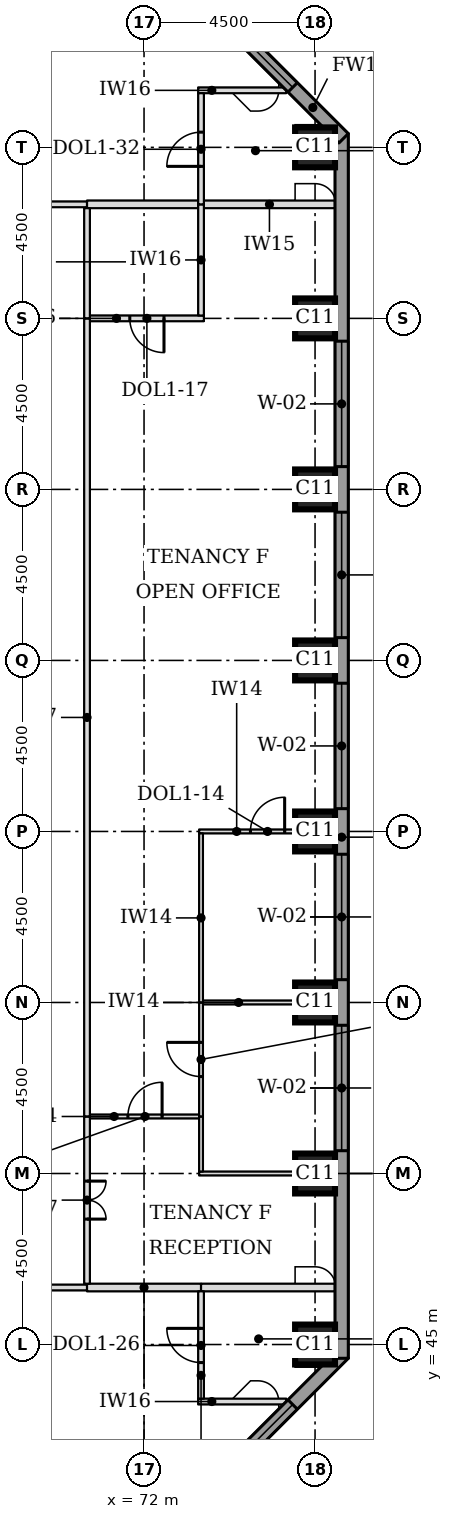
"""IFC4 building model, lengths in metres.
Left out: names, types, materials, properties, quantities, classifications, styles, units other than length and angle.
Written with IfcOpenShell. Run it as: python <this file> out.ifc"""

import sys

from ifc_helpers import new_model, si_unit, direction, frame, frame_2d, origin, origin_2d, place, context, subcontext, project, spatial, rectangle, extrude, element, fill, save


model = new_model("IFC4")
c1 = context("Model", 3, precision=1e-05, world=origin(), true_north=direction((0.0, 1.0)))
c2 = subcontext(c1, "Body", "Model", "MODEL_VIEW")
j1 = project(units=[si_unit("LENGTHUNIT", "METRE"), si_unit("PLANEANGLEUNIT", "RADIAN")], contexts=[c1])
p1 = place(None, origin())
s1 = spatial("IfcSite", under=j1, at=p1, CompositionType="ELEMENT")
p2 = place(p1, origin())
s2 = spatial("IfcBuilding", under=s1, at=p2, CompositionType="ELEMENT")
p3 = place(p2, frame((0.0, 0.0, 78.9)))
s3 = spatial("IfcBuildingStorey", under=s2, at=p3, CompositionType="ELEMENT", Elevation=78.9)
for number, where, z_axis, x_axis in (
    (1, (76.5, 45.0, 0.0), (0.0, 0.0, 1.0), (1.0, 0.0, 0.0)),
    (2, (76.5, 49.5, 0.0), (0.0, 0.0, 1.0), (1.0, 0.0, 0.0)),
    (3, (76.5, 54.0, 0.0), (0.0, 0.0, 1.0), (1.0, 0.0, 0.0)),
    (4, (76.5, 58.5, 0.0), (0.0, 0.0, 1.0), (1.0, 0.0, 0.0)),
    (5, (76.5, 63.0, 0.0), (0.0, 0.0, 1.0), (1.0, 0.0, 0.0)),
    (6, (76.5, 67.5, 0.0), (0.0, 0.0, 1.0), (1.0, 0.0, 0.0)),
    (7, (76.5, 72.0, 0.0), (0.0, 0.0, 1.0), (1.0, 0.0, 0.0)),
    (8, (76.5, 76.5, 0.0), (0.0, 0.0, 1.0), (1.0, 0.0, 0.0)),
):
    element("IfcColumn", number, at=place(p3, frame(where, z_axis=z_axis, x_axis=x_axis)), inside=s3, PredefinedType="COLUMN", context=c2, shape_type="SweptSolid", body=[
        extrude(rectangle(XDim=1.05, YDim=1.05, at=origin_2d()), origin(), (0.0, 0.0, 1.0), 3.7),
    ])
p4 = place(p3, frame((72.239, 39.749, 0.0), z_axis=(0.0, 0.0, 1.0), x_axis=(0.707106781187, 0.707106781187, 0.0)))
e9 = element("IfcWall", 9, at=p4, inside=s3, PredefinedType="STANDARD", context=c2, shape_type="SweptSolid", body=[
    extrude(rectangle(XDim=7.089, YDim=0.35, at=frame_2d((3.544, 0.0))), origin(), (0.0, 0.0, 1.0), 3.525),
])
p5 = place(p4, frame((1.894, 0.0, 0.9)))
e10 = element("IfcOpeningElement", 10, at=p5, cuts=e9, PredefinedType="OPENING", context=c2, shape_type="SweptSolid", body=[
    extrude(rectangle(XDim=3.3, YDim=1.9, at=frame_2d((1.65, 0.95))), frame((0.0, 0.185, 0.0), z_axis=(0.0, -1.0, 0.0), x_axis=(1.0, 0.0, 0.0)), (0.0, 0.0, 1.0), 0.37),
])
p6 = place(p3, frame((77.2, 44.638, 0.0), z_axis=(0.0, 0.0, 1.0), x_axis=(0.0, 1.0, 0.0)))
e11 = element("IfcWall", 11, at=p6, inside=s3, PredefinedType="STANDARD", context=c2, shape_type="SweptSolid", body=[
    extrude(rectangle(XDim=32.225, YDim=0.35, at=frame_2d((16.112, 0.0))), origin(), (0.0, 0.0, 1.0), 3.525),
])
p7 = place(p6, frame((5.462, 0.0, 0.9)))
e12 = element("IfcOpeningElement", 12, at=p7, cuts=e11, PredefinedType="OPENING", context=c2, shape_type="SweptSolid", body=[
    extrude(rectangle(XDim=3.3, YDim=1.9, at=frame_2d((1.65, 0.95))), frame((0.0, 0.185, 0.0), z_axis=(0.0, -1.0, 0.0), x_axis=(1.0, 0.0, 0.0)), (0.0, 0.0, 1.0), 0.37),
])
p8 = place(p6, frame((9.962, 0.0, 0.9)))
e13 = element("IfcOpeningElement", 13, at=p8, cuts=e11, PredefinedType="OPENING", context=c2, shape_type="SweptSolid", body=[
    extrude(rectangle(XDim=3.3, YDim=1.9, at=frame_2d((1.65, 0.95))), frame((0.0, 0.185, 0.0), z_axis=(0.0, -1.0, 0.0), x_axis=(1.0, 0.0, 0.0)), (0.0, 0.0, 1.0), 0.37),
])
p9 = place(p6, frame((14.462, 0.0, 0.9)))
e14 = element("IfcOpeningElement", 14, at=p9, cuts=e11, PredefinedType="OPENING", context=c2, shape_type="SweptSolid", body=[
    extrude(rectangle(XDim=3.3, YDim=1.9, at=frame_2d((1.65, 0.95))), frame((0.0, 0.185, 0.0), z_axis=(0.0, -1.0, 0.0), x_axis=(1.0, 0.0, 0.0)), (0.0, 0.0, 1.0), 0.37),
])
p10 = place(p6, frame((18.962, 0.0, 0.9)))
e15 = element("IfcOpeningElement", 15, at=p10, cuts=e11, PredefinedType="OPENING", context=c2, shape_type="SweptSolid", body=[
    extrude(rectangle(XDim=3.3, YDim=1.9, at=frame_2d((1.65, 0.95))), frame((0.0, 0.185, 0.0), z_axis=(0.0, -1.0, 0.0), x_axis=(1.0, 0.0, 0.0)), (0.0, 0.0, 1.0), 0.37),
])
p11 = place(p6, frame((23.462, 0.0, 0.9)))
e16 = element("IfcOpeningElement", 16, at=p11, cuts=e11, PredefinedType="OPENING", context=c2, shape_type="SweptSolid", body=[
    extrude(rectangle(XDim=3.3, YDim=1.9, at=frame_2d((1.65, 0.95))), frame((0.0, 0.185, 0.0), z_axis=(0.0, -1.0, 0.0), x_axis=(1.0, 0.0, 0.0)), (0.0, 0.0, 1.0), 0.37),
])
p12 = place(p3, frame((77.251, 76.739, 0.0), z_axis=(0.0, 0.0, 1.0), x_axis=(-0.707106781187, 0.707106781187, 0.0)))
e17 = element("IfcWall", 17, at=p12, inside=s3, PredefinedType="STANDARD", context=c2, shape_type="SweptSolid", body=[
    extrude(rectangle(XDim=7.089, YDim=0.35, at=frame_2d((3.544, 0.0))), origin(), (0.0, 0.0, 1.0), 3.525),
])
p13 = place(p12, frame((1.894, 0.0, 0.9)))
e18 = element("IfcOpeningElement", 18, at=p13, cuts=e17, PredefinedType="OPENING", context=c2, shape_type="SweptSolid", body=[
    extrude(rectangle(XDim=3.3, YDim=1.9, at=frame_2d((1.65, 0.95))), frame((0.0, 0.185, 0.0), z_axis=(0.0, -1.0, 0.0), x_axis=(1.0, 0.0, 0.0)), (0.0, 0.0, 1.0), 0.37),
])
p14 = place(p3, frame((73.425, 43.5, 0.0), z_axis=(0.0, 0.0, 1.0), x_axis=(1.0, 0.0, 0.0)))
e19 = element("IfcWall", 19, at=p14, inside=s3, PredefinedType="PARTITIONING", context=c2, shape_type="SweptSolid", body=[
    extrude(rectangle(XDim=2.317, YDim=0.15, at=frame_2d((1.159, 0.0))), origin(), (0.0, 0.0, 1.0), 3.55),
])
p15 = place(p3, frame((54.0, 46.5, 0.0), z_axis=(0.0, 0.0, 1.0), x_axis=(1.0, 0.0, 0.0)))
e20 = element("IfcWall", 20, at=p15, inside=s3, PredefinedType="PARTITIONING", context=c2, shape_type="SweptSolid", body=[
    extrude(rectangle(XDim=16.5, YDim=0.15, at=frame_2d((8.25, 0.0))), origin(), (0.0, 0.0, 1.0), 3.55),
])
p16 = place(p3, frame((70.5, 46.5, 0.0), z_axis=(0.0, 0.0, 1.0), x_axis=(1.0, 0.0, 0.0)))
e21 = element("IfcWall", 21, at=p16, inside=s3, PredefinedType="PARTITIONING", context=c2, shape_type="SweptSolid", body=[
    extrude(rectangle(XDim=3.0, YDim=0.2, at=frame_2d((1.5, 0.0))), origin(), (0.0, 0.0, 1.0), 3.55),
])
p17 = place(p3, frame((73.5, 46.5, 0.0), z_axis=(0.0, 0.0, 1.0), x_axis=(1.0, 0.0, 0.0)))
e22 = element("IfcWall", 22, at=p17, inside=s3, PredefinedType="PARTITIONING", context=c2, shape_type="SweptSolid", body=[
    extrude(rectangle(XDim=3.525, YDim=0.2, at=frame_2d((1.762, 0.0))), origin(), (0.0, 0.0, 1.0), 3.55),
])
p18 = place(p3, frame((73.45, 49.5, 0.0), z_axis=(0.0, 0.0, 1.0), x_axis=(1.0, 0.0, 0.0)))
e23 = element("IfcWall", 23, at=p18, inside=s3, PredefinedType="PARTITIONING", context=c2, shape_type="SweptSolid", body=[
    extrude(rectangle(XDim=3.575, YDim=0.1, at=frame_2d((1.788, 0.0))), origin(), (0.0, 0.0, 1.0), 3.55),
])
p19 = place(p3, frame((70.575, 51.0, 0.0), z_axis=(0.0, 0.0, 1.0), x_axis=(1.0, 0.0, 0.0)))
e24 = element("IfcWall", 24, at=p19, inside=s3, PredefinedType="PARTITIONING", context=c2, shape_type="SweptSolid", body=[
    extrude(rectangle(XDim=2.875, YDim=0.1, at=frame_2d((1.438, 0.0))), origin(), (0.0, 0.0, 1.0), 3.022),
])
p20 = place(p19, frame((1.0, 0.0, 0.0)))
e25 = element("IfcOpeningElement", 25, at=p20, cuts=e24, PredefinedType="OPENING", context=c2, shape_type="SweptSolid", body=[
    extrude(rectangle(XDim=0.9, YDim=2.1, at=frame_2d((0.45, 1.05))), frame((0.0, 0.06, 0.0), z_axis=(0.0, -1.0, 0.0), x_axis=(1.0, 0.0, 0.0)), (0.0, 0.0, 1.0), 0.12),
])
p21 = place(p3, frame((73.55, 54.0, 0.0), z_axis=(0.0, 0.0, 1.0), x_axis=(1.0, 0.0, 0.0)))
e26 = element("IfcWall", 26, at=p21, inside=s3, PredefinedType="PARTITIONING", context=c2, shape_type="SweptSolid", body=[
    extrude(rectangle(XDim=3.475, YDim=0.1, at=frame_2d((1.737, 0.0))), origin(), (0.0, 0.0, 1.0), 3.55),
])
p22 = place(p3, frame((73.45, 58.5, 0.0), z_axis=(0.0, 0.0, 1.0), x_axis=(1.0, 0.0, 0.0)))
e27 = element("IfcWall", 27, at=p22, inside=s3, PredefinedType="PARTITIONING", context=c2, shape_type="SweptSolid", body=[
    extrude(rectangle(XDim=3.575, YDim=0.1, at=frame_2d((1.788, 0.0))), origin(), (0.0, 0.0, 1.0), 3.55),
])
p23 = place(p22, frame((1.35, 0.0, 0.0)))
e28 = element("IfcOpeningElement", 28, at=p23, cuts=e27, PredefinedType="OPENING", context=c2, shape_type="SweptSolid", body=[
    extrude(rectangle(XDim=0.9, YDim=2.1, at=frame_2d((0.45, 1.05))), frame((0.0, 0.06, 0.0), z_axis=(0.0, -1.0, 0.0), x_axis=(1.0, 0.0, 0.0)), (0.0, 0.0, 1.0), 0.12),
])
p24 = place(p3, frame((70.575, 72.0, 0.0), z_axis=(0.0, 0.0, 1.0), x_axis=(1.0, 0.0, 0.0)))
e29 = element("IfcWall", 29, at=p24, inside=s3, PredefinedType="PARTITIONING", context=c2, shape_type="SweptSolid", body=[
    extrude(rectangle(XDim=3.0, YDim=0.15, at=frame_2d((1.5, 0.0))), origin(), (0.0, 0.0, 1.0), 3.55),
])
p25 = place(p24, frame((1.05, 0.0, 0.0)))
e30 = element("IfcOpeningElement", 30, at=p25, cuts=e29, PredefinedType="OPENING", context=c2, shape_type="SweptSolid", body=[
    extrude(rectangle(XDim=0.9, YDim=2.1, at=frame_2d((0.45, 1.05))), frame((0.0, 0.085, 0.0), z_axis=(0.0, -1.0, 0.0), x_axis=(1.0, 0.0, 0.0)), (0.0, 0.0, 1.0), 0.17),
])
p26 = place(p3, frame((46.5, 75.0, 0.0), z_axis=(0.0, 0.0, 1.0), x_axis=(1.0, 0.0, 0.0)))
e31 = element("IfcWall", 31, at=p26, inside=s3, PredefinedType="PARTITIONING", context=c2, shape_type="SweptSolid", body=[
    extrude(rectangle(XDim=24.0, YDim=0.15, at=frame_2d((12.0, 0.0))), origin(), (0.0, 0.0, 1.0), 3.55),
])
p27 = place(p3, frame((70.5, 75.0, 0.0), z_axis=(0.0, 0.0, 1.0), x_axis=(1.0, 0.0, 0.0)))
e32 = element("IfcWall", 32, at=p27, inside=s3, PredefinedType="PARTITIONING", context=c2, shape_type="SweptSolid", body=[
    extrude(rectangle(XDim=2.925, YDim=0.2, at=frame_2d((1.462, 0.0))), origin(), (0.0, 0.0, 1.0), 3.55),
])
p28 = place(p3, frame((73.575, 75.0, 0.0), z_axis=(0.0, 0.0, 1.0), x_axis=(1.0, 0.0, 0.0)))
e33 = element("IfcWall", 33, at=p28, inside=s3, PredefinedType="PARTITIONING", context=c2, shape_type="SweptSolid", body=[
    extrude(rectangle(XDim=3.45, YDim=0.2, at=frame_2d((1.725, 0.0))), origin(), (0.0, 0.0, 1.0), 3.55),
])
p29 = place(p3, frame((73.425, 78.0, 0.0), z_axis=(0.0, 0.0, 1.0), x_axis=(1.0, 0.0, 0.0)))
e34 = element("IfcWall", 34, at=p29, inside=s3, PredefinedType="PARTITIONING", context=c2, shape_type="SweptSolid", body=[
    extrude(rectangle(XDim=2.317, YDim=0.15, at=frame_2d((1.159, 0.0))), origin(), (0.0, 0.0, 1.0), 3.55),
])
p30 = place(p3, frame((73.5, 43.575, 0.0), z_axis=(0.0, 0.0, 1.0), x_axis=(0.0, 1.0, 0.0)))
e35 = element("IfcWall", 35, at=p30, inside=s3, PredefinedType="PARTITIONING", context=c2, shape_type="SweptSolid", body=[
    extrude(rectangle(XDim=2.825, YDim=0.15, at=frame_2d((1.413, 0.0))), origin(), (0.0, 0.0, 1.0), 3.55),
])
p31 = place(p30, frame((0.95, 0.0, 0.0)))
e36 = element("IfcOpeningElement", 36, at=p31, cuts=e35, PredefinedType="OPENING", context=c2, shape_type="SweptSolid", body=[
    extrude(rectangle(XDim=0.9, YDim=2.1, at=frame_2d((0.45, 1.05))), frame((0.0, 0.085, 0.0), z_axis=(0.0, -1.0, 0.0), x_axis=(1.0, 0.0, 0.0)), (0.0, 0.0, 1.0), 0.17),
])
p32 = place(p3, frame((70.5, 46.6, 0.0), z_axis=(0.0, 0.0, 1.0), x_axis=(0.0, 1.0, 0.0)))
e37 = element("IfcWall", 37, at=p32, inside=s3, PredefinedType="PARTITIONING", context=c2, shape_type="SweptSolid", body=[
    extrude(rectangle(XDim=4.4, YDim=0.15, at=frame_2d((2.2, 0.0))), origin(), (0.0, 0.0, 1.0), 3.55),
])
p33 = place(p32, frame((1.7, 0.0, 0.0)))
e38 = element("IfcOpeningElement", 38, at=p33, cuts=e37, PredefinedType="OPENING", context=c2, shape_type="SweptSolid", body=[
    extrude(rectangle(XDim=1.0, YDim=2.1, at=frame_2d((0.5, 1.05))), frame((0.0, 0.085, 0.0), z_axis=(0.0, -1.0, 0.0), x_axis=(1.0, 0.0, 0.0)), (0.0, 0.0, 1.0), 0.17),
])
p34 = place(p3, frame((73.5, 49.55, 0.0), z_axis=(0.0, 0.0, 1.0), x_axis=(0.0, 1.0, 0.0)))
e39 = element("IfcWall", 39, at=p34, inside=s3, PredefinedType="PARTITIONING", context=c2, shape_type="SweptSolid", body=[
    extrude(rectangle(XDim=1.45, YDim=0.1, at=frame_2d((0.725, 0.0))), origin(), (0.0, 0.0, 1.0), 3.55),
])
p35 = place(p3, frame((70.5, 51.0, 0.0), z_axis=(0.0, 0.0, 1.0), x_axis=(0.0, 1.0, 0.0)))
e40 = element("IfcWall", 40, at=p35, inside=s3, PredefinedType="PARTITIONING", context=c2, shape_type="SweptSolid", body=[
    extrude(rectangle(XDim=21.0, YDim=0.15, at=frame_2d((10.5, 0.0))), origin(), (0.0, 0.0, 1.0), 3.55),
])
p36 = place(p3, frame((73.5, 51.0, 0.0), z_axis=(0.0, 0.0, 1.0), x_axis=(0.0, 1.0, 0.0)))
e41 = element("IfcWall", 41, at=p36, inside=s3, PredefinedType="PARTITIONING", context=c2, shape_type="SweptSolid", body=[
    extrude(rectangle(XDim=3.0, YDim=0.1, at=frame_2d((1.5, 0.0))), origin(), (0.0, 0.0, 1.0), 3.55),
])
p37 = place(p36, frame((1.05, 0.0, 0.0)))
e42 = element("IfcOpeningElement", 42, at=p37, cuts=e41, PredefinedType="OPENING", context=c2, shape_type="SweptSolid", body=[
    extrude(rectangle(XDim=0.9, YDim=2.1, at=frame_2d((0.45, 1.05))), frame((0.0, 0.06, 0.0), z_axis=(0.0, -1.0, 0.0), x_axis=(1.0, 0.0, 0.0)), (0.0, 0.0, 1.0), 0.12),
])
p38 = place(p3, frame((73.5, 54.0, 0.0), z_axis=(0.0, 0.0, 1.0), x_axis=(0.0, 1.0, 0.0)))
e43 = element("IfcWall", 43, at=p38, inside=s3, PredefinedType="PARTITIONING", context=c2, shape_type="SweptSolid", body=[
    extrude(rectangle(XDim=4.45, YDim=0.1, at=frame_2d((2.225, 0.0))), origin(), (0.0, 0.0, 1.0), 3.55),
])
p39 = place(p3, frame((70.5, 72.0, 0.0), z_axis=(0.0, 0.0, 1.0), x_axis=(0.0, 1.0, 0.0)))
e44 = element("IfcWall", 44, at=p39, inside=s3, PredefinedType="PARTITIONING", context=c2, shape_type="SweptSolid", body=[
    extrude(rectangle(XDim=2.9, YDim=0.15, at=frame_2d((1.45, 0.0))), origin(), (0.0, 0.0, 1.0), 3.55),
])
p40 = place(p3, frame((73.5, 72.075, 0.0), z_axis=(0.0, 0.0, 1.0), x_axis=(0.0, 1.0, 0.0)))
e45 = element("IfcWall", 45, at=p40, inside=s3, PredefinedType="PARTITIONING", context=c2, shape_type="SweptSolid", body=[
    extrude(rectangle(XDim=2.925, YDim=0.15, at=frame_2d((1.462, 0.0))), origin(), (0.0, 0.0, 1.0), 3.55),
])
p41 = place(p3, frame((73.5, 75.0, 0.0), z_axis=(0.0, 0.0, 1.0), x_axis=(0.0, 1.0, 0.0)))
e46 = element("IfcWall", 46, at=p41, inside=s3, PredefinedType="PARTITIONING", context=c2, shape_type="SweptSolid", body=[
    extrude(rectangle(XDim=2.925, YDim=0.15, at=frame_2d((1.462, 0.0))), origin(), (0.0, 0.0, 1.0), 3.55),
])
p42 = place(p41, frame((1.0, 0.0, 0.0)))
e47 = element("IfcOpeningElement", 47, at=p42, cuts=e46, PredefinedType="OPENING", context=c2, shape_type="SweptSolid", body=[
    extrude(rectangle(XDim=0.9, YDim=2.1, at=frame_2d((0.45, 1.05))), frame((0.0, 0.085, 0.0), z_axis=(0.0, -1.0, 0.0), x_axis=(1.0, 0.0, 0.0)), (0.0, 0.0, 1.0), 0.17),
])
p43 = place(p5, origin())
e48 = element("IfcWindow", 48, at=p43, inside=s3, PartitioningType="SINGLE_PANEL", PredefinedType="WINDOW", context=c2, shape_type="SweptSolid", body=[
    extrude(rectangle(XDim=3.3, YDim=1.9, at=frame_2d((1.65, 0.95))), frame((0.0, 0.085, 0.0), z_axis=(0.0, -1.0, 0.0), x_axis=(1.0, 0.0, 0.0)), (0.0, 0.0, 1.0), 0.06),
])
fill(e10, e48)
p44 = place(p7, origin())
e49 = element("IfcWindow", 49, at=p44, inside=s3, PartitioningType="SINGLE_PANEL", PredefinedType="WINDOW", context=c2, shape_type="SweptSolid", body=[
    extrude(rectangle(XDim=3.3, YDim=1.9, at=frame_2d((1.65, 0.95))), frame((0.0, 0.085, 0.0), z_axis=(0.0, -1.0, 0.0), x_axis=(1.0, 0.0, 0.0)), (0.0, 0.0, 1.0), 0.06),
])
fill(e12, e49)
p45 = place(p8, origin())
e50 = element("IfcWindow", 50, at=p45, inside=s3, PartitioningType="SINGLE_PANEL", PredefinedType="WINDOW", context=c2, shape_type="SweptSolid", body=[
    extrude(rectangle(XDim=3.3, YDim=1.9, at=frame_2d((1.65, 0.95))), frame((0.0, 0.085, 0.0), z_axis=(0.0, -1.0, 0.0), x_axis=(1.0, 0.0, 0.0)), (0.0, 0.0, 1.0), 0.06),
])
fill(e13, e50)
p46 = place(p9, origin())
e51 = element("IfcWindow", 51, at=p46, inside=s3, PartitioningType="SINGLE_PANEL", PredefinedType="WINDOW", context=c2, shape_type="SweptSolid", body=[
    extrude(rectangle(XDim=3.3, YDim=1.9, at=frame_2d((1.65, 0.95))), frame((0.0, 0.085, 0.0), z_axis=(0.0, -1.0, 0.0), x_axis=(1.0, 0.0, 0.0)), (0.0, 0.0, 1.0), 0.06),
])
fill(e14, e51)
p47 = place(p10, origin())
e52 = element("IfcWindow", 52, at=p47, inside=s3, PartitioningType="SINGLE_PANEL", PredefinedType="WINDOW", context=c2, shape_type="SweptSolid", body=[
    extrude(rectangle(XDim=3.3, YDim=1.9, at=frame_2d((1.65, 0.95))), frame((0.0, 0.085, 0.0), z_axis=(0.0, -1.0, 0.0), x_axis=(1.0, 0.0, 0.0)), (0.0, 0.0, 1.0), 0.06),
])
fill(e15, e52)
p48 = place(p11, origin())
e53 = element("IfcWindow", 53, at=p48, inside=s3, PartitioningType="SINGLE_PANEL", PredefinedType="WINDOW", context=c2, shape_type="SweptSolid", body=[
    extrude(rectangle(XDim=3.3, YDim=1.9, at=frame_2d((1.65, 0.95))), frame((0.0, 0.085, 0.0), z_axis=(0.0, -1.0, 0.0), x_axis=(1.0, 0.0, 0.0)), (0.0, 0.0, 1.0), 0.06),
])
fill(e16, e53)
p49 = place(p13, origin())
e54 = element("IfcWindow", 54, at=p49, inside=s3, PartitioningType="SINGLE_PANEL", PredefinedType="WINDOW", context=c2, shape_type="SweptSolid", body=[
    extrude(rectangle(XDim=3.3, YDim=1.9, at=frame_2d((1.65, 0.95))), frame((0.0, 0.085, 0.0), z_axis=(0.0, -1.0, 0.0), x_axis=(1.0, 0.0, 0.0)), (0.0, 0.0, 1.0), 0.06),
])
fill(e18, e54)
p50 = place(p31, origin())
e55 = element("IfcDoor", 55, at=p50, inside=s3, OperationType="SINGLE_SWING_RIGHT", PredefinedType="DOOR", context=c2, shape_type="SweptSolid", body=[
    extrude(rectangle(XDim=0.9, YDim=2.1, at=frame_2d((0.45, 1.05))), frame((0.0, 0.025, 0.0), z_axis=(0.0, -1.0, 0.0), x_axis=(1.0, 0.0, 0.0)), (0.0, 0.0, 1.0), 0.05),
])
fill(e36, e55)
p51 = place(p33, frame((1.0, 0.0, 0.0), z_axis=(0.0, 0.0, 1.0), x_axis=(-1.0, 0.0, 0.0)))
e56 = element("IfcDoor", 56, at=p51, inside=s3, OperationType="DOUBLE_DOOR_SINGLE_SWING", PredefinedType="DOOR", context=c2, shape_type="SweptSolid", body=[
    extrude(rectangle(XDim=1.0, YDim=2.1, at=frame_2d((0.5, 1.05))), frame((0.0, 0.025, 0.0), z_axis=(0.0, -1.0, 0.0), x_axis=(1.0, 0.0, 0.0)), (0.0, 0.0, 1.0), 0.05),
])
fill(e38, e56)
p52 = place(p20, origin())
e57 = element("IfcDoor", 57, at=p52, inside=s3, OperationType="SINGLE_SWING_RIGHT", PredefinedType="DOOR", context=c2, shape_type="SweptSolid", body=[
    extrude(rectangle(XDim=0.9, YDim=2.1, at=frame_2d((0.45, 1.05))), frame((0.0, 0.025, 0.0), z_axis=(0.0, -1.0, 0.0), x_axis=(1.0, 0.0, 0.0)), (0.0, 0.0, 1.0), 0.05),
])
fill(e25, e57)
p53 = place(p37, origin())
e58 = element("IfcDoor", 58, at=p53, inside=s3, OperationType="SINGLE_SWING_RIGHT", PredefinedType="DOOR", context=c2, shape_type="SweptSolid", body=[
    extrude(rectangle(XDim=0.9, YDim=2.1, at=frame_2d((0.45, 1.05))), frame((0.0, 0.025, 0.0), z_axis=(0.0, -1.0, 0.0), x_axis=(1.0, 0.0, 0.0)), (0.0, 0.0, 1.0), 0.05),
])
fill(e42, e58)
p54 = place(p23, origin())
e59 = element("IfcDoor", 59, at=p54, inside=s3, OperationType="SINGLE_SWING_RIGHT", PredefinedType="DOOR", context=c2, shape_type="SweptSolid", body=[
    extrude(rectangle(XDim=0.9, YDim=2.1, at=frame_2d((0.45, 1.05))), frame((0.0, 0.025, 0.0), z_axis=(0.0, -1.0, 0.0), x_axis=(1.0, 0.0, 0.0)), (0.0, 0.0, 1.0), 0.05),
])
fill(e28, e59)
p55 = place(p25, frame((0.9, 0.0, 0.0), z_axis=(0.0, 0.0, 1.0), x_axis=(-1.0, 0.0, 0.0)))
e60 = element("IfcDoor", 60, at=p55, inside=s3, OperationType="SINGLE_SWING_LEFT", PredefinedType="DOOR", context=c2, shape_type="SweptSolid", body=[
    extrude(rectangle(XDim=0.9, YDim=2.1, at=frame_2d((0.45, 1.05))), frame((0.0, 0.025, 0.0), z_axis=(0.0, -1.0, 0.0), x_axis=(1.0, 0.0, 0.0)), (0.0, 0.0, 1.0), 0.05),
])
fill(e30, e60)
p56 = place(p42, origin())
e61 = element("IfcDoor", 61, at=p56, inside=s3, OperationType="SINGLE_SWING_LEFT", PredefinedType="DOOR", context=c2, shape_type="SweptSolid", body=[
    extrude(rectangle(XDim=0.9, YDim=2.1, at=frame_2d((0.45, 1.05))), frame((0.0, 0.025, 0.0), z_axis=(0.0, -1.0, 0.0), x_axis=(1.0, 0.0, 0.0)), (0.0, 0.0, 1.0), 0.05),
])
fill(e47, e61)
save(model, sys.argv[1])
